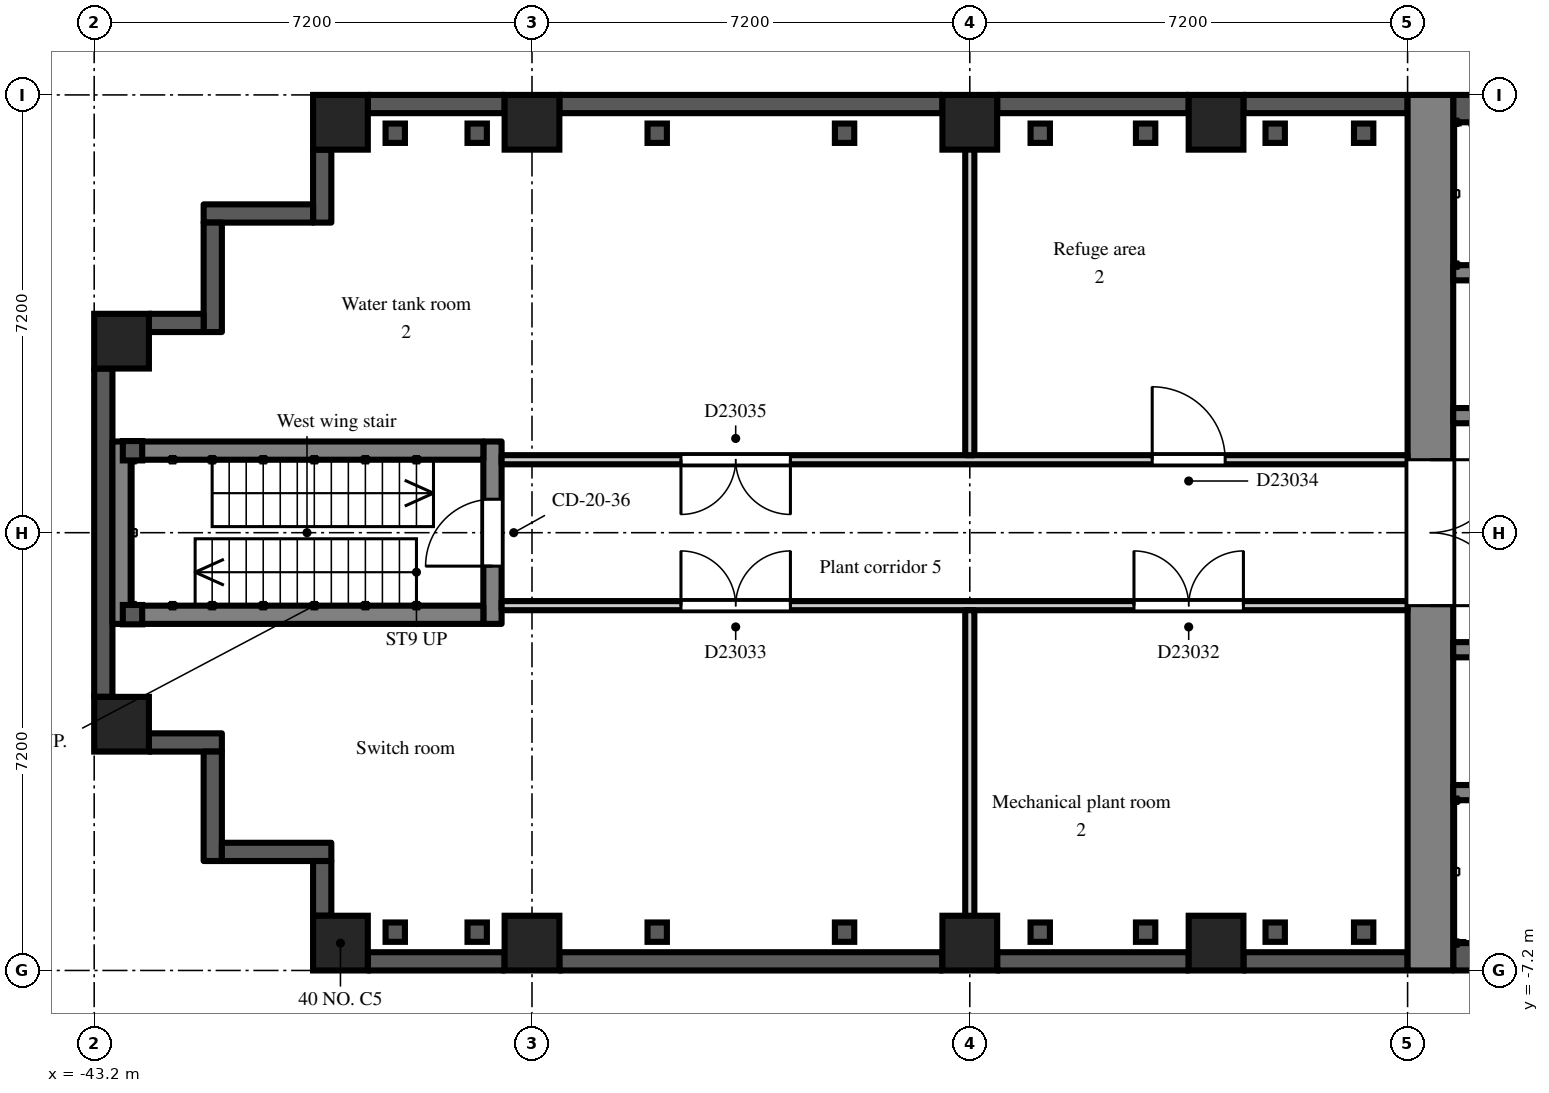
"""IFC4 building model, lengths in metres.
Left out: names, types, materials, properties, quantities, classifications, styles, units other than length and angle.
Written with IfcOpenShell. Run it as: python <this file> out.ifc"""

import sys

from ifc_helpers import new_model, si_unit, direction, frame, frame_2d, origin, origin_2d, place, context, subcontext, project, spatial, rectangle, extrude, element, fill, save


model = new_model("IFC4")
c1 = context("Model", 3, precision=1e-05, world=origin(), true_north=direction((0.0, 1.0)))
c2 = subcontext(c1, "Body", "Model", "MODEL_VIEW")
j1 = project(units=[si_unit("LENGTHUNIT", "METRE"), si_unit("PLANEANGLEUNIT", "RADIAN")], contexts=[c1])
p1 = place(None, origin())
s1 = spatial("IfcSite", under=j1, at=p1, CompositionType="ELEMENT")
p2 = place(p1, origin())
s2 = spatial("IfcBuilding", under=s1, at=p2, CompositionType="ELEMENT")
p3 = place(p2, frame((0.0, 0.0, 162.3)))
s3 = spatial("IfcBuildingStorey", under=s2, at=p3, CompositionType="ELEMENT", Elevation=162.3)
for number, where, z_axis, x_axis in (
    (1, (-42.75, -3.15, 0.0), (0.0, 0.0, 1.0), (1.0, 0.0, 0.0)),
    (2, (-42.75, 3.15, 0.0), (0.0, 0.0, 1.0), (1.0, 0.0, 0.0)),
    (3, (-39.15, -6.75, 0.0), (0.0, 0.0, 1.0), (1.0, 0.0, 0.0)),
    (4, (-39.15, 6.75, 0.0), (0.0, 0.0, 1.0), (1.0, 0.0, 0.0)),
    (5, (-36.0, -6.75, 0.0), (0.0, 0.0, 1.0), (1.0, 0.0, 0.0)),
    (6, (-36.0, 6.75, 0.0), (0.0, 0.0, 1.0), (1.0, 0.0, 0.0)),
    (7, (-28.8, -6.75, 0.0), (0.0, 0.0, 1.0), (1.0, 0.0, 0.0)),
    (8, (-28.8, 6.75, 0.0), (0.0, 0.0, 1.0), (1.0, 0.0, 0.0)),
    (9, (-24.75, -6.75, 0.0), (0.0, 0.0, 1.0), (1.0, 0.0, 0.0)),
    (10, (-24.75, 6.75, 0.0), (0.0, 0.0, 1.0), (1.0, 0.0, 0.0)),
):
    element("IfcColumn", number, at=place(p3, frame(where, z_axis=z_axis, x_axis=x_axis)), inside=s3, PredefinedType="COLUMN", context=c2, shape_type="SweptSolid", body=[
        extrude(rectangle(XDim=0.9, YDim=0.9, at=origin_2d()), origin(), (0.0, 0.0, 1.0), 4.2),
    ])
p4 = place(p3, frame((-21.6, 7.05, 0.0), z_axis=(0.0, 0.0, 1.0), x_axis=(-1.0, 0.0, 0.0)))
e11 = element("IfcWall", 11, at=p4, inside=s3, PredefinedType="SOLIDWALL", context=c2, shape_type="SweptSolid", body=[
    extrude(rectangle(XDim=2.7, YDim=0.3, at=frame_2d((1.35, 0.0))), origin(), (0.0, 0.0, 1.0), 3.4),
])
p5 = place(p3, frame((-25.2, 7.05, 0.0), z_axis=(0.0, 0.0, 1.0), x_axis=(-1.0, 0.0, 0.0)))
e12 = element("IfcWall", 12, at=p5, inside=s3, PredefinedType="SOLIDWALL", context=c2, shape_type="SweptSolid", body=[
    extrude(rectangle(XDim=3.15, YDim=0.3, at=frame_2d((1.575, 0.0))), origin(), (0.0, 0.0, 1.0), 3.4),
])
p6 = place(p3, frame((-29.25, 7.05, 0.0), z_axis=(0.0, 0.0, 1.0), x_axis=(-1.0, 0.0, 0.0)))
e13 = element("IfcWall", 13, at=p6, inside=s3, PredefinedType="SOLIDWALL", context=c2, shape_type="SweptSolid", body=[
    extrude(rectangle(XDim=6.3, YDim=0.3, at=frame_2d((3.15, 0.0))), origin(), (0.0, 0.0, 1.0), 3.4),
])
p7 = place(p3, frame((-36.45, 7.05, 0.0), z_axis=(0.0, 0.0, 1.0), x_axis=(-1.0, 0.0, 0.0)))
e14 = element("IfcWall", 14, at=p7, inside=s3, PredefinedType="SOLIDWALL", context=c2, shape_type="SweptSolid", body=[
    extrude(rectangle(XDim=2.25, YDim=0.3, at=frame_2d((1.125, 0.0))), origin(), (0.0, 0.0, 1.0), 3.4),
])
p8 = place(p3, frame((-39.45, 6.3, 0.0), z_axis=(0.0, 0.0, 1.0), x_axis=(0.0, -1.0, 0.0)))
e15 = element("IfcWall", 15, at=p8, inside=s3, PredefinedType="SOLIDWALL", context=c2, shape_type="SweptSolid", body=[
    extrude(rectangle(XDim=1.2, YDim=0.3, at=frame_2d((0.6, 0.0))), origin(), (0.0, 0.0, 1.0), 3.8),
])
p9 = place(p3, frame((-39.6, 5.25, 0.0), z_axis=(0.0, 0.0, 1.0), x_axis=(-1.0, 0.0, 0.0)))
e16 = element("IfcWall", 16, at=p9, inside=s3, PredefinedType="SOLIDWALL", context=c2, shape_type="SweptSolid", body=[
    extrude(rectangle(XDim=1.8, YDim=0.3, at=frame_2d((0.9, 0.0))), origin(), (0.0, 0.0, 1.0), 3.8),
])
p10 = place(p3, frame((-41.25, 5.1, 0.0), z_axis=(0.0, 0.0, 1.0), x_axis=(0.0, -1.0, 0.0)))
e17 = element("IfcWall", 17, at=p10, inside=s3, PredefinedType="SOLIDWALL", context=c2, shape_type="SweptSolid", body=[
    extrude(rectangle(XDim=1.8, YDim=0.3, at=frame_2d((0.9, 0.0))), origin(), (0.0, 0.0, 1.0), 3.8),
])
p11 = place(p3, frame((-41.4, 3.45, 0.0), z_axis=(0.0, 0.0, 1.0), x_axis=(-1.0, 0.0, 0.0)))
e18 = element("IfcWall", 18, at=p11, inside=s3, PredefinedType="SOLIDWALL", context=c2, shape_type="SweptSolid", body=[
    extrude(rectangle(XDim=0.9, YDim=0.3, at=frame_2d((0.45, 0.0))), origin(), (0.0, 0.0, 1.0), 3.8),
])
p12 = place(p3, frame((-43.05, 2.7, 0.0), z_axis=(0.0, 0.0, 1.0), x_axis=(0.0, -1.0, 0.0)))
e19 = element("IfcWall", 19, at=p12, inside=s3, PredefinedType="SOLIDWALL", context=c2, shape_type="SweptSolid", body=[
    extrude(rectangle(XDim=5.4, YDim=0.3, at=frame_2d((2.7, 0.0))), origin(), (0.0, 0.0, 1.0), 3.4),
])
p13 = place(p3, frame((-42.3, -3.45, 0.0), z_axis=(0.0, 0.0, 1.0), x_axis=(1.0, 0.0, 0.0)))
e20 = element("IfcWall", 20, at=p13, inside=s3, PredefinedType="SOLIDWALL", context=c2, shape_type="SweptSolid", body=[
    extrude(rectangle(XDim=1.2, YDim=0.3, at=frame_2d((0.6, 0.0))), origin(), (0.0, 0.0, 1.0), 3.8),
])
p14 = place(p3, frame((-41.25, -3.6, 0.0), z_axis=(0.0, 0.0, 1.0), x_axis=(0.0, -1.0, 0.0)))
e21 = element("IfcWall", 21, at=p14, inside=s3, PredefinedType="SOLIDWALL", context=c2, shape_type="SweptSolid", body=[
    extrude(rectangle(XDim=1.8, YDim=0.3, at=frame_2d((0.9, 0.0))), origin(), (0.0, 0.0, 1.0), 3.8),
])
p15 = place(p3, frame((-41.1, -5.25, 0.0), z_axis=(0.0, 0.0, 1.0), x_axis=(1.0, 0.0, 0.0)))
e22 = element("IfcWall", 22, at=p15, inside=s3, PredefinedType="SOLIDWALL", context=c2, shape_type="SweptSolid", body=[
    extrude(rectangle(XDim=1.8, YDim=0.3, at=frame_2d((0.9, 0.0))), origin(), (0.0, 0.0, 1.0), 3.8),
])
p16 = place(p3, frame((-39.45, -5.4, 0.0), z_axis=(0.0, 0.0, 1.0), x_axis=(0.0, -1.0, 0.0)))
e23 = element("IfcWall", 23, at=p16, inside=s3, PredefinedType="SOLIDWALL", context=c2, shape_type="SweptSolid", body=[
    extrude(rectangle(XDim=0.9, YDim=0.3, at=frame_2d((0.45, 0.0))), origin(), (0.0, 0.0, 1.0), 3.8),
])
p17 = place(p3, frame((-38.7, -7.05, 0.0), z_axis=(0.0, 0.0, 1.0), x_axis=(1.0, 0.0, 0.0)))
e24 = element("IfcWall", 24, at=p17, inside=s3, PredefinedType="SOLIDWALL", context=c2, shape_type="SweptSolid", body=[
    extrude(rectangle(XDim=2.25, YDim=0.3, at=frame_2d((1.125, 0.0))), origin(), (0.0, 0.0, 1.0), 3.4),
])
p18 = place(p3, frame((-35.55, -7.05, 0.0), z_axis=(0.0, 0.0, 1.0), x_axis=(1.0, 0.0, 0.0)))
e25 = element("IfcWall", 25, at=p18, inside=s3, PredefinedType="SOLIDWALL", context=c2, shape_type="SweptSolid", body=[
    extrude(rectangle(XDim=6.3, YDim=0.3, at=frame_2d((3.15, 0.0))), origin(), (0.0, 0.0, 1.0), 3.4),
])
p19 = place(p3, frame((-28.35, -7.05, 0.0), z_axis=(0.0, 0.0, 1.0), x_axis=(1.0, 0.0, 0.0)))
e26 = element("IfcWall", 26, at=p19, inside=s3, PredefinedType="SOLIDWALL", context=c2, shape_type="SweptSolid", body=[
    extrude(rectangle(XDim=3.15, YDim=0.3, at=frame_2d((1.575, 0.0))), origin(), (0.0, 0.0, 1.0), 3.4),
])
p20 = place(p3, frame((-24.3, -7.05, 0.0), z_axis=(0.0, 0.0, 1.0), x_axis=(1.0, 0.0, 0.0)))
e27 = element("IfcWall", 27, at=p20, inside=s3, PredefinedType="SOLIDWALL", context=c2, shape_type="SweptSolid", body=[
    extrude(rectangle(XDim=2.7, YDim=0.3, at=frame_2d((1.35, 0.0))), origin(), (0.0, 0.0, 1.0), 3.4),
])
p21 = place(p3, frame((-21.225, -7.2, 0.0), z_axis=(0.0, 0.0, 1.0), x_axis=(0.0, 1.0, 0.0)))
e28 = element("IfcWall", 28, at=p21, inside=s3, PredefinedType="SHEAR", context=c2, shape_type="SweptSolid", body=[
    extrude(rectangle(XDim=14.4, YDim=0.75, at=frame_2d((7.2, 0.0))), origin(), (0.0, 0.0, 1.0), 3.8),
])
p22 = place(p21, frame((6.0, 0.0, 0.0)))
e29 = element("IfcOpeningElement", 29, at=p22, cuts=e28, PredefinedType="OPENING", context=c2, shape_type="SweptSolid", body=[
    extrude(rectangle(XDim=2.4, YDim=2.2, at=frame_2d((1.2, 1.1))), frame((0.0, 0.385, 0.0), z_axis=(0.0, -1.0, 0.0), x_axis=(1.0, 0.0, 0.0)), (0.0, 0.0, 1.0), 0.77),
])
p23 = place(p3, frame((-7.9, 6.975, 0.0), z_axis=(0.0, 0.0, 1.0), x_axis=(-1.0, 0.0, 0.0)))
e30 = element("IfcWall", 30, at=p23, inside=s3, PredefinedType="SHEAR", context=c2, shape_type="SweptSolid", body=[
    extrude(rectangle(XDim=12.95, YDim=0.45, at=frame_2d((6.475, 0.0))), origin(), (0.0, 0.0, 1.0), 3.8),
])
p24 = place(p3, frame((-7.9, 1.925, 0.0), z_axis=(0.0, 0.0, 1.0), x_axis=(-1.0, 0.0, 0.0)))
e31 = element("IfcWall", 31, at=p24, inside=s3, PredefinedType="SHEAR", context=c2, shape_type="SweptSolid", body=[
    extrude(rectangle(XDim=12.95, YDim=0.25, at=frame_2d((6.475, 0.0))), origin(), (0.0, 0.0, 1.0), 3.8),
])
p25 = place(p24, frame((4.825, 0.0, 0.0)))
e32 = element("IfcOpeningElement", 32, at=p25, cuts=e31, PredefinedType="OPENING", context=c2, shape_type="SweptSolid", body=[
    extrude(rectangle(XDim=1.1, YDim=2.1, at=frame_2d((0.55, 1.05))), frame((0.0, 0.135, 0.0), z_axis=(0.0, -1.0, 0.0), x_axis=(1.0, 0.0, 0.0)), (0.0, 0.0, 1.0), 0.27),
])
p26 = place(p24, frame((7.025, 0.0, 0.0)))
e33 = element("IfcOpeningElement", 33, at=p26, cuts=e31, PredefinedType="OPENING", context=c2, shape_type="SweptSolid", body=[
    extrude(rectangle(XDim=1.1, YDim=2.1, at=frame_2d((0.55, 1.05))), frame((0.0, 0.135, 0.0), z_axis=(0.0, -1.0, 0.0), x_axis=(1.0, 0.0, 0.0)), (0.0, 0.0, 1.0), 0.27),
])
p27 = place(p24, frame((9.225, 0.0, 0.0)))
e34 = element("IfcOpeningElement", 34, at=p27, cuts=e31, PredefinedType="OPENING", context=c2, shape_type="SweptSolid", body=[
    extrude(rectangle(XDim=1.1, YDim=2.1, at=frame_2d((0.55, 1.05))), frame((0.0, 0.135, 0.0), z_axis=(0.0, -1.0, 0.0), x_axis=(1.0, 0.0, 0.0)), (0.0, 0.0, 1.0), 0.27),
])
p28 = place(p24, frame((0.525, 0.0, 0.0)))
e35 = element("IfcOpeningElement", 35, at=p28, cuts=e31, PredefinedType="OPENING", context=c2, shape_type="SweptSolid", body=[
    extrude(rectangle(XDim=0.9, YDim=2.1, at=frame_2d((0.45, 1.05))), frame((0.0, 0.135, 0.0), z_axis=(0.0, -1.0, 0.0), x_axis=(1.0, 0.0, 0.0)), (0.0, 0.0, 1.0), 0.27),
])
p29 = place(p24, frame((2.625, 0.0, 0.0)))
e36 = element("IfcOpeningElement", 36, at=p29, cuts=e31, PredefinedType="OPENING", context=c2, shape_type="SweptSolid", body=[
    extrude(rectangle(XDim=1.1, YDim=2.1, at=frame_2d((0.55, 1.05))), frame((0.0, 0.135, 0.0), z_axis=(0.0, -1.0, 0.0), x_axis=(1.0, 0.0, 0.0)), (0.0, 0.0, 1.0), 0.27),
])
p30 = place(p24, frame((11.525, 0.0, 0.0)))
e37 = element("IfcOpeningElement", 37, at=p30, cuts=e31, PredefinedType="OPENING", context=c2, shape_type="SweptSolid", body=[
    extrude(rectangle(XDim=0.9, YDim=2.1, at=frame_2d((0.45, 1.05))), frame((0.0, 0.135, 0.0), z_axis=(0.0, -1.0, 0.0), x_axis=(1.0, 0.0, 0.0)), (0.0, 0.0, 1.0), 0.27),
])
p31 = place(p3, frame((-12.3, 4.275, 0.0), z_axis=(0.0, 0.0, 1.0), x_axis=(-1.0, 0.0, 0.0)))
e38 = element("IfcWall", 38, at=p31, inside=s3, PredefinedType="SHEAR", context=c2, shape_type="SweptSolid", body=[
    extrude(rectangle(XDim=8.55, YDim=0.25, at=frame_2d((4.275, 0.0))), origin(), (0.0, 0.0, 1.0), 3.8),
])
p32 = place(p3, frame((-7.9, -6.975, 0.0), z_axis=(0.0, 0.0, 1.0), x_axis=(-1.0, 0.0, 0.0)))
e39 = element("IfcWall", 39, at=p32, inside=s3, PredefinedType="SHEAR", context=c2, shape_type="SweptSolid", body=[
    extrude(rectangle(XDim=12.95, YDim=0.45, at=frame_2d((6.475, 0.0))), origin(), (0.0, 0.0, 1.0), 3.8),
])
p33 = place(p3, frame((-7.9, -1.925, 0.0), z_axis=(0.0, 0.0, 1.0), x_axis=(-1.0, 0.0, 0.0)))
e40 = element("IfcWall", 40, at=p33, inside=s3, PredefinedType="SHEAR", context=c2, shape_type="SweptSolid", body=[
    extrude(rectangle(XDim=12.95, YDim=0.25, at=frame_2d((6.475, 0.0))), origin(), (0.0, 0.0, 1.0), 3.8),
])
p34 = place(p33, frame((0.525, 0.0, 0.0)))
e41 = element("IfcOpeningElement", 41, at=p34, cuts=e40, PredefinedType="OPENING", context=c2, shape_type="SweptSolid", body=[
    extrude(rectangle(XDim=0.9, YDim=2.1, at=frame_2d((0.45, 1.05))), frame((0.0, 0.135, 0.0), z_axis=(0.0, -1.0, 0.0), x_axis=(1.0, 0.0, 0.0)), (0.0, 0.0, 1.0), 0.27),
])
p35 = place(p33, frame((2.625, 0.0, 0.0)))
e42 = element("IfcOpeningElement", 42, at=p35, cuts=e40, PredefinedType="OPENING", context=c2, shape_type="SweptSolid", body=[
    extrude(rectangle(XDim=1.1, YDim=2.1, at=frame_2d((0.55, 1.05))), frame((0.0, 0.135, 0.0), z_axis=(0.0, -1.0, 0.0), x_axis=(1.0, 0.0, 0.0)), (0.0, 0.0, 1.0), 0.27),
])
p36 = place(p33, frame((4.925, 0.0, 0.0)))
e43 = element("IfcOpeningElement", 43, at=p36, cuts=e40, PredefinedType="OPENING", context=c2, shape_type="SweptSolid", body=[
    extrude(rectangle(XDim=0.9, YDim=2.1, at=frame_2d((0.45, 1.05))), frame((0.0, 0.135, 0.0), z_axis=(0.0, -1.0, 0.0), x_axis=(1.0, 0.0, 0.0)), (0.0, 0.0, 1.0), 0.27),
])
p37 = place(p33, frame((8.225, 0.0, 0.0)))
e44 = element("IfcOpeningElement", 44, at=p37, cuts=e40, PredefinedType="OPENING", context=c2, shape_type="SweptSolid", body=[
    extrude(rectangle(XDim=0.9, YDim=2.1, at=frame_2d((0.45, 1.05))), frame((0.0, 0.135, 0.0), z_axis=(0.0, -1.0, 0.0), x_axis=(1.0, 0.0, 0.0)), (0.0, 0.0, 1.0), 0.27),
])
p38 = place(p33, frame((11.525, 0.0, 0.0)))
e45 = element("IfcOpeningElement", 45, at=p38, cuts=e40, PredefinedType="OPENING", context=c2, shape_type="SweptSolid", body=[
    extrude(rectangle(XDim=0.9, YDim=2.1, at=frame_2d((0.45, 1.05))), frame((0.0, 0.135, 0.0), z_axis=(0.0, -1.0, 0.0), x_axis=(1.0, 0.0, 0.0)), (0.0, 0.0, 1.0), 0.27),
])
p39 = place(p3, frame((-12.3, -4.275, 0.0), z_axis=(0.0, 0.0, 1.0), x_axis=(-1.0, 0.0, 0.0)))
e46 = element("IfcWall", 46, at=p39, inside=s3, PredefinedType="SHEAR", context=c2, shape_type="SweptSolid", body=[
    extrude(rectangle(XDim=8.55, YDim=0.25, at=frame_2d((4.275, 0.0))), origin(), (0.0, 0.0, 1.0), 3.8),
])
p40 = place(p3, frame((-36.65, -1.5, 0.0), z_axis=(0.0, 0.0, 1.0), x_axis=(0.0, 1.0, 0.0)))
e47 = element("IfcWall", 47, at=p40, inside=s3, PredefinedType="SHEAR", context=c2, shape_type="SweptSolid", body=[
    extrude(rectangle(XDim=3.0, YDim=0.3, at=frame_2d((1.5, 0.0))), origin(), (0.0, 0.0, 1.0), 3.8),
])
p41 = place(p40, frame((0.95, 0.0, 0.0)))
e48 = element("IfcOpeningElement", 48, at=p41, cuts=e47, PredefinedType="OPENING", context=c2, shape_type="SweptSolid", body=[
    extrude(rectangle(XDim=1.1, YDim=2.1, at=frame_2d((0.55, 1.05))), frame((0.0, 0.16, 0.0), z_axis=(0.0, -1.0, 0.0), x_axis=(1.0, 0.0, 0.0)), (0.0, 0.0, 1.0), 0.32),
])
p42 = place(p3, frame((-42.75, -1.5, 0.0), z_axis=(0.0, 0.0, 1.0), x_axis=(0.0, 1.0, 0.0)))
e49 = element("IfcWall", 49, at=p42, inside=s3, PredefinedType="SHEAR", context=c2, shape_type="SweptSolid", body=[
    extrude(rectangle(XDim=3.0, YDim=0.3, at=frame_2d((1.5, 0.0))), origin(), (0.0, 0.0, 1.0), 3.8),
])
for number, where, z_axis, x_axis in (
    (50, (-36.8, -1.35, 0.0), (0.0, 0.0, 1.0), (-1.0, 0.0, 0.0)),
    (51, (-36.8, 1.35, 0.0), (0.0, 0.0, 1.0), (-1.0, 0.0, 0.0)),
):
    element("IfcWall", number, at=place(p3, frame(where, z_axis=z_axis, x_axis=x_axis)), inside=s3, PredefinedType="SHEAR", context=c2, shape_type="SweptSolid", body=[
        extrude(rectangle(XDim=5.8, YDim=0.3, at=frame_2d((2.9, 0.0))), origin(), (0.0, 0.0, 1.0), 3.8),
    ])
p43 = place(p3, frame((-36.5, -1.2, 0.0), z_axis=(0.0, 0.0, 1.0), x_axis=(1.0, 0.0, 0.0)))
e52 = element("IfcWall", 52, at=p43, inside=s3, PredefinedType="PARTITIONING", context=c2, shape_type="SweptSolid", body=[
    extrude(rectangle(XDim=14.9, YDim=0.15, at=frame_2d((7.45, 0.0))), origin(), (0.0, 0.0, 1.0), 3.8),
])
p44 = place(p43, frame((10.4, 0.0, 0.0)))
e53 = element("IfcOpeningElement", 53, at=p44, cuts=e52, PredefinedType="OPENING", context=c2, shape_type="SweptSolid", body=[
    extrude(rectangle(XDim=1.8, YDim=2.1, at=frame_2d((0.9, 1.05))), frame((0.0, 0.085, 0.0), z_axis=(0.0, -1.0, 0.0), x_axis=(1.0, 0.0, 0.0)), (0.0, 0.0, 1.0), 0.17),
])
p45 = place(p43, frame((2.95, 0.0, 0.0)))
e54 = element("IfcOpeningElement", 54, at=p45, cuts=e52, PredefinedType="OPENING", context=c2, shape_type="SweptSolid", body=[
    extrude(rectangle(XDim=1.8, YDim=2.1, at=frame_2d((0.9, 1.05))), frame((0.0, 0.085, 0.0), z_axis=(0.0, -1.0, 0.0), x_axis=(1.0, 0.0, 0.0)), (0.0, 0.0, 1.0), 0.17),
])
p46 = place(p3, frame((-36.5, 1.2, 0.0), z_axis=(0.0, 0.0, 1.0), x_axis=(1.0, 0.0, 0.0)))
e55 = element("IfcWall", 55, at=p46, inside=s3, PredefinedType="PARTITIONING", context=c2, shape_type="SweptSolid", body=[
    extrude(rectangle(XDim=14.9, YDim=0.15, at=frame_2d((7.45, 0.0))), origin(), (0.0, 0.0, 1.0), 3.8),
])
p47 = place(p46, frame((10.7, 0.0, 0.0)))
e56 = element("IfcOpeningElement", 56, at=p47, cuts=e55, PredefinedType="OPENING", context=c2, shape_type="SweptSolid", body=[
    extrude(rectangle(XDim=1.2, YDim=2.1, at=frame_2d((0.6, 1.05))), frame((0.0, 0.085, 0.0), z_axis=(0.0, -1.0, 0.0), x_axis=(1.0, 0.0, 0.0)), (0.0, 0.0, 1.0), 0.17),
])
p48 = place(p46, frame((2.95, 0.0, 0.0)))
e57 = element("IfcOpeningElement", 57, at=p48, cuts=e55, PredefinedType="OPENING", context=c2, shape_type="SweptSolid", body=[
    extrude(rectangle(XDim=1.8, YDim=2.1, at=frame_2d((0.9, 1.05))), frame((0.0, 0.085, 0.0), z_axis=(0.0, -1.0, 0.0), x_axis=(1.0, 0.0, 0.0)), (0.0, 0.0, 1.0), 0.17),
])
for number, where, z_axis, x_axis in (
    (58, (-28.8, -6.9, 0.0), (0.0, 0.0, 1.0), (0.0, 1.0, 0.0)),
    (59, (-28.8, 1.275, 0.0), (0.0, 0.0, 1.0), (0.0, 1.0, 0.0)),
):
    element("IfcWall", number, at=place(p3, frame(where, z_axis=z_axis, x_axis=x_axis)), inside=s3, PredefinedType="PARTITIONING", context=c2, shape_type="SweptSolid", body=[
        extrude(rectangle(XDim=5.625, YDim=0.15, at=frame_2d((2.812, 0.0))), origin(), (0.0, 0.0, 1.0), 3.8),
    ])
p49 = place(p22, frame((2.4, 0.0, 0.0), z_axis=(0.0, 0.0, 1.0), x_axis=(-1.0, 0.0, 0.0)))
e60 = element("IfcDoor", 60, at=p49, inside=s3, OperationType="DOUBLE_DOOR_DOUBLE_SWING", PredefinedType="DOOR", context=c2, shape_type="SweptSolid", body=[
    extrude(rectangle(XDim=2.4, YDim=2.2, at=frame_2d((1.2, 1.1))), frame((0.0, 0.025, 0.0), z_axis=(0.0, -1.0, 0.0), x_axis=(1.0, 0.0, 0.0)), (0.0, 0.0, 1.0), 0.05),
])
fill(e29, e60)
p50 = place(p41, origin())
e61 = element("IfcDoor", 61, at=p50, inside=s3, OperationType="SINGLE_SWING_LEFT", PredefinedType="DOOR", context=c2, shape_type="SweptSolid", body=[
    extrude(rectangle(XDim=1.1, YDim=2.1, at=frame_2d((0.55, 1.05))), frame((0.0, 0.025, 0.0), z_axis=(0.0, -1.0, 0.0), x_axis=(1.0, 0.0, 0.0)), (0.0, 0.0, 1.0), 0.05),
])
fill(e48, e61)
p51 = place(p44, origin())
e62 = element("IfcDoor", 62, at=p51, inside=s3, OperationType="DOUBLE_DOOR_DOUBLE_SWING", PredefinedType="DOOR", context=c2, shape_type="SweptSolid", body=[
    extrude(rectangle(XDim=1.8, YDim=2.1, at=frame_2d((0.9, 1.05))), frame((0.0, 0.025, 0.0), z_axis=(0.0, -1.0, 0.0), x_axis=(1.0, 0.0, 0.0)), (0.0, 0.0, 1.0), 0.05),
])
fill(e53, e62)
p52 = place(p45, origin())
e63 = element("IfcDoor", 63, at=p52, inside=s3, OperationType="DOUBLE_DOOR_DOUBLE_SWING", PredefinedType="DOOR", context=c2, shape_type="SweptSolid", body=[
    extrude(rectangle(XDim=1.8, YDim=2.1, at=frame_2d((0.9, 1.05))), frame((0.0, 0.025, 0.0), z_axis=(0.0, -1.0, 0.0), x_axis=(1.0, 0.0, 0.0)), (0.0, 0.0, 1.0), 0.05),
])
fill(e54, e63)
p53 = place(p47, origin())
e64 = element("IfcDoor", 64, at=p53, inside=s3, OperationType="SINGLE_SWING_LEFT", PredefinedType="DOOR", context=c2, shape_type="SweptSolid", body=[
    extrude(rectangle(XDim=1.2, YDim=2.1, at=frame_2d((0.6, 1.05))), frame((0.0, 0.025, 0.0), z_axis=(0.0, -1.0, 0.0), x_axis=(1.0, 0.0, 0.0)), (0.0, 0.0, 1.0), 0.05),
])
fill(e56, e64)
p54 = place(p48, frame((1.8, 0.0, 0.0), z_axis=(0.0, 0.0, 1.0), x_axis=(-1.0, 0.0, 0.0)))
e65 = element("IfcDoor", 65, at=p54, inside=s3, OperationType="DOUBLE_DOOR_DOUBLE_SWING", PredefinedType="DOOR", context=c2, shape_type="SweptSolid", body=[
    extrude(rectangle(XDim=1.8, YDim=2.1, at=frame_2d((0.9, 1.05))), frame((0.0, 0.025, 0.0), z_axis=(0.0, -1.0, 0.0), x_axis=(1.0, 0.0, 0.0)), (0.0, 0.0, 1.0), 0.05),
])
fill(e57, e65)
save(model, sys.argv[1])
